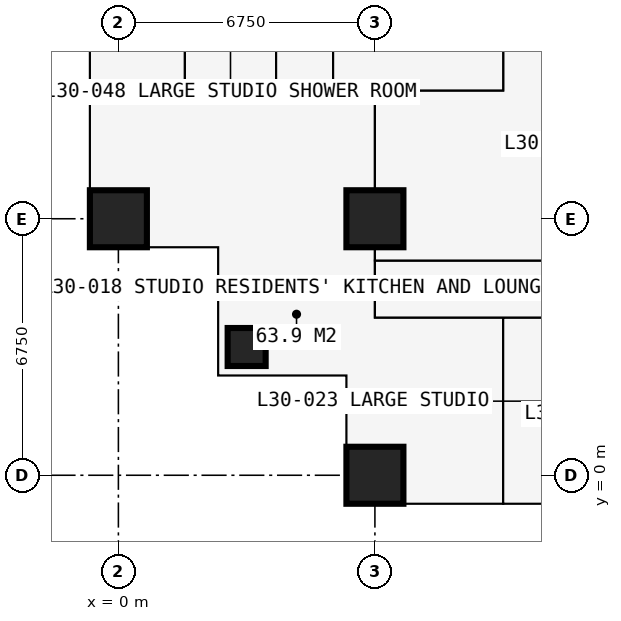
"""IFC4 building model, lengths in metres.
Left out: names, types, materials, properties, quantities, classifications, styles, units other than length and angle.
Written with IfcOpenShell. Run it as: python <this file> out.ifc"""

import sys

from ifc_helpers import new_model, si_unit, direction, frame, frame_2d, origin, origin_2d, place, context, subcontext, project, spatial, rectangle, extrude, element, fill, save


model = new_model("IFC4")
c1 = context("Model", 3, precision=1e-05, world=origin(), true_north=direction((0.0, 1.0)))
c2 = subcontext(c1, "Body", "Model", "MODEL_VIEW")
j1 = project(units=[si_unit("LENGTHUNIT", "METRE"), si_unit("PLANEANGLEUNIT", "RADIAN")], contexts=[c1])
p1 = place(None, origin())
s1 = spatial("IfcSite", under=j1, at=p1, CompositionType="ELEMENT")
p2 = place(p1, origin())
s2 = spatial("IfcBuilding", under=s1, at=p2, CompositionType="ELEMENT")
p3 = place(p2, frame((0.0, 0.0, 112.5)))
s3 = spatial("IfcBuildingStorey", under=s2, at=p3, CompositionType="ELEMENT", Elevation=112.5)
p4 = place(p3, frame((0.0, 6.75, 0.0), z_axis=(0.0, 0.0, 1.0), x_axis=(1.0, 0.0, 0.0)))
e1 = element("IfcColumn", 1, at=p4, inside=s3, PredefinedType="COLUMN", context=c2, shape_type="SweptSolid", body=[
    extrude(rectangle(XDim=1.5, YDim=1.5, at=origin_2d()), origin(), (0.0, 0.0, 1.0), 3.6),
])
p5 = place(p3, frame((3.375, 3.375, 0.0), z_axis=(0.0, 0.0, 1.0), x_axis=(1.0, 0.0, 0.0)))
e2 = element("IfcColumn", 2, at=p5, inside=s3, PredefinedType="COLUMN", context=c2, shape_type="SweptSolid", body=[
    extrude(rectangle(XDim=1.0, YDim=1.0, at=origin_2d()), origin(), (0.0, 0.0, 1.0), 3.6),
])
for number, where, z_axis, x_axis in (
    (3, (6.75, 0.0, 0.0), (0.0, 0.0, 1.0), (1.0, 0.0, 0.0)),
    (4, (6.75, 6.75, 0.0), (0.0, 0.0, 1.0), (1.0, 0.0, 0.0)),
):
    element("IfcColumn", number, at=place(p3, frame(where, z_axis=z_axis, x_axis=x_axis)), inside=s3, PredefinedType="COLUMN", context=c2, shape_type="SweptSolid", body=[
        extrude(rectangle(XDim=1.5, YDim=1.5, at=origin_2d()), origin(), (0.0, 0.0, 1.0), 3.6),
    ])
p6 = place(p3, frame((-0.75, 6.0, 0.0), z_axis=(0.0, 0.0, 1.0), x_axis=(1.0, 0.0, 0.0)))
e5 = element("IfcWall", 5, at=p6, inside=s3, PredefinedType="SOLIDWALL", context=c2, shape_type="SweptSolid", body=[
    extrude(rectangle(XDim=3.375, YDim=0.3, at=frame_2d((1.688, 0.0))), origin(), (0.0, 0.0, 1.0), 3.375),
])
p7 = place(p6, frame((1.607, 0.0, 0.9)))
e6 = element("IfcOpeningElement", 6, at=p7, cuts=e5, PredefinedType="OPENING", context=c2, shape_type="SweptSolid", body=[
    extrude(rectangle(XDim=1.5, YDim=1.8, at=frame_2d((0.75, 0.9))), frame((0.0, 0.16, 0.0), z_axis=(0.0, -1.0, 0.0), x_axis=(1.0, 0.0, 0.0)), (0.0, 0.0, 1.0), 0.32),
])
p8 = place(p3, frame((2.625, 6.0, 0.0), z_axis=(0.0, 0.0, 1.0), x_axis=(0.0, -1.0, 0.0)))
e7 = element("IfcWall", 7, at=p8, inside=s3, PredefinedType="SOLIDWALL", context=c2, shape_type="SweptSolid", body=[
    extrude(rectangle(XDim=3.375, YDim=0.3, at=frame_2d((1.688, 0.0))), origin(), (0.0, 0.0, 1.0), 3.375),
])
p9 = place(p8, frame((0.788, 0.0, 0.6)))
e8 = element("IfcOpeningElement", 8, at=p9, cuts=e7, PredefinedType="OPENING", context=c2, shape_type="SweptSolid", body=[
    extrude(rectangle(XDim=1.8, YDim=2.1, at=frame_2d((0.9, 1.05))), frame((0.0, 0.16, 0.0), z_axis=(0.0, -1.0, 0.0), x_axis=(1.0, 0.0, 0.0)), (0.0, 0.0, 1.0), 0.32),
])
p10 = place(p3, frame((2.625, 2.625, 0.0), z_axis=(0.0, 0.0, 1.0), x_axis=(1.0, 0.0, 0.0)))
e9 = element("IfcWall", 9, at=p10, inside=s3, PredefinedType="SOLIDWALL", context=c2, shape_type="SweptSolid", body=[
    extrude(rectangle(XDim=3.375, YDim=0.3, at=frame_2d((1.688, 0.0))), origin(), (0.0, 0.0, 1.0), 3.375),
])
p11 = place(p10, frame((0.788, 0.0, 0.6)))
e10 = element("IfcOpeningElement", 10, at=p11, cuts=e9, PredefinedType="OPENING", context=c2, shape_type="SweptSolid", body=[
    extrude(rectangle(XDim=1.8, YDim=2.1, at=frame_2d((0.9, 1.05))), frame((0.0, 0.16, 0.0), z_axis=(0.0, -1.0, 0.0), x_axis=(1.0, 0.0, 0.0)), (0.0, 0.0, 1.0), 0.32),
])
p12 = place(p3, frame((6.0, 2.625, 0.0), z_axis=(0.0, 0.0, 1.0), x_axis=(0.0, -1.0, 0.0)))
e11 = element("IfcWall", 11, at=p12, inside=s3, PredefinedType="SOLIDWALL", context=c2, shape_type="SweptSolid", body=[
    extrude(rectangle(XDim=3.375, YDim=0.3, at=frame_2d((1.688, 0.0))), origin(), (0.0, 0.0, 1.0), 3.375),
])
p13 = place(p12, frame((0.268, 0.0, 0.9)))
e12 = element("IfcOpeningElement", 12, at=p13, cuts=e11, PredefinedType="OPENING", context=c2, shape_type="SweptSolid", body=[
    extrude(rectangle(XDim=1.5, YDim=1.8, at=frame_2d((0.75, 0.9))), frame((0.0, 0.16, 0.0), z_axis=(0.0, -1.0, 0.0), x_axis=(1.0, 0.0, 0.0)), (0.0, 0.0, 1.0), 0.32),
])
p14 = place(p3, frame((-0.734, 10.125, 0.0), z_axis=(0.0, 0.0, 1.0), x_axis=(1.0, 0.0, 0.0)))
e13 = element("IfcWall", 13, at=p14, inside=s3, PredefinedType="PARTITIONING", context=c2, shape_type="SweptSolid", body=[
    extrude(rectangle(XDim=10.859, YDim=0.15, at=frame_2d((5.429, 0.0))), origin(), (0.0, 0.0, 1.0), 3.375),
])
p15 = place(p3, frame((1.75, 10.125, 0.0), z_axis=(0.0, 0.0, 1.0), x_axis=(0.0, 1.0, 0.0)))
e14 = element("IfcWall", 14, at=p15, inside=s3, PredefinedType="PARTITIONING", context=c2, shape_type="SweptSolid", body=[
    extrude(rectangle(XDim=2.6, YDim=0.1, at=frame_2d((1.3, 0.0))), origin(), (0.0, 0.0, 1.0), 3.375),
])
p16 = place(p15, frame((0.85, 0.0, 0.0)))
e15 = element("IfcOpeningElement", 15, at=p16, cuts=e14, PredefinedType="OPENING", context=c2, shape_type="SweptSolid", body=[
    extrude(rectangle(XDim=0.9, YDim=2.2, at=frame_2d((0.45, 1.1))), frame((0.0, 0.06, 0.0), z_axis=(0.0, -1.0, 0.0), x_axis=(1.0, 0.0, 0.0)), (0.0, 0.0, 1.0), 0.12),
])
p17 = place(p3, frame((4.15, 10.125, 0.0), z_axis=(0.0, 0.0, 1.0), x_axis=(0.0, 1.0, 0.0)))
e16 = element("IfcWall", 16, at=p17, inside=s3, PredefinedType="PARTITIONING", context=c2, shape_type="SweptSolid", body=[
    extrude(rectangle(XDim=16.875, YDim=0.1, at=frame_2d((8.438, 0.0))), origin(), (0.0, 0.0, 1.0), 3.375),
])
p18 = place(p17, frame((4.2, 0.0, 0.0)))
e17 = element("IfcOpeningElement", 17, at=p18, cuts=e16, PredefinedType="OPENING", context=c2, shape_type="SweptSolid", body=[
    extrude(rectangle(XDim=0.95, YDim=2.2, at=frame_2d((0.475, 1.1))), frame((0.0, 0.06, 0.0), z_axis=(0.0, -1.0, 0.0), x_axis=(1.0, 0.0, 0.0)), (0.0, 0.0, 1.0), 0.12),
])
p19 = place(p17, frame((10.95, 0.0, 0.0)))
e18 = element("IfcOpeningElement", 18, at=p19, cuts=e16, PredefinedType="OPENING", context=c2, shape_type="SweptSolid", body=[
    extrude(rectangle(XDim=0.95, YDim=2.2, at=frame_2d((0.475, 1.1))), frame((0.0, 0.06, 0.0), z_axis=(0.0, -1.0, 0.0), x_axis=(1.0, 0.0, 0.0)), (0.0, 0.0, 1.0), 0.12),
])
p20 = place(p3, frame((5.65, 10.125, 0.0), z_axis=(0.0, 0.0, 1.0), x_axis=(0.0, 1.0, 0.0)))
e19 = element("IfcWall", 19, at=p20, inside=s3, PredefinedType="PARTITIONING", context=c2, shape_type="SweptSolid", body=[
    extrude(rectangle(XDim=10.762, YDim=0.15, at=frame_2d((5.381, 0.0))), origin(), (0.0, 0.0, 1.0), 3.375),
])
p21 = place(p20, frame((4.9, 0.0, 0.0)))
e20 = element("IfcOpeningElement", 20, at=p21, cuts=e19, PredefinedType="OPENING", context=c2, shape_type="SweptSolid", body=[
    extrude(rectangle(XDim=0.95, YDim=2.2, at=frame_2d((0.475, 1.1))), frame((0.0, 0.085, 0.0), z_axis=(0.0, -1.0, 0.0), x_axis=(1.0, 0.0, 0.0)), (0.0, 0.0, 1.0), 0.17),
])
p22 = place(p3, frame((6.75, 4.15, 0.0), z_axis=(0.0, 0.0, 1.0), x_axis=(0.0, 1.0, 0.0)))
e21 = element("IfcWall", 21, at=p22, inside=s3, PredefinedType="PARTITIONING", context=c2, shape_type="SweptSolid", body=[
    extrude(rectangle(XDim=5.975, YDim=0.15, at=frame_2d((2.988, 0.0))), origin(), (0.0, 0.0, 1.0), 2.877),
])
p23 = place(p3, frame((6.75, 4.15, 0.0), z_axis=(0.0, 0.0, 1.0), x_axis=(1.0, 0.0, 0.0)))
e22 = element("IfcWall", 22, at=p23, inside=s3, PredefinedType="PARTITIONING", context=c2, shape_type="SweptSolid", body=[
    extrude(rectangle(XDim=23.625, YDim=0.15, at=frame_2d((11.812, 0.0))), origin(), (0.0, 0.0, 1.0), 3.375),
])
p24 = place(p23, frame((1.2, 0.0, 0.0)))
e23 = element("IfcOpeningElement", 23, at=p24, cuts=e22, PredefinedType="OPENING", context=c2, shape_type="SweptSolid", body=[
    extrude(rectangle(XDim=1.0, YDim=2.2, at=frame_2d((0.5, 1.1))), frame((0.0, 0.085, 0.0), z_axis=(0.0, -1.0, 0.0), x_axis=(1.0, 0.0, 0.0)), (0.0, 0.0, 1.0), 0.17),
])
p25 = place(p23, frame((18.475, 0.0, 0.0)))
e24 = element("IfcOpeningElement", 24, at=p25, cuts=e22, PredefinedType="OPENING", context=c2, shape_type="SweptSolid", body=[
    extrude(rectangle(XDim=0.95, YDim=2.2, at=frame_2d((0.475, 1.1))), frame((0.0, 0.085, 0.0), z_axis=(0.0, -1.0, 0.0), x_axis=(1.0, 0.0, 0.0)), (0.0, 0.0, 1.0), 0.17),
])
p26 = place(p23, frame((11.725, 0.0, 0.0)))
e25 = element("IfcOpeningElement", 25, at=p26, cuts=e22, PredefinedType="OPENING", context=c2, shape_type="SweptSolid", body=[
    extrude(rectangle(XDim=0.95, YDim=2.2, at=frame_2d((0.475, 1.1))), frame((0.0, 0.085, 0.0), z_axis=(0.0, -1.0, 0.0), x_axis=(1.0, 0.0, 0.0)), (0.0, 0.0, 1.0), 0.17),
])
p27 = place(p23, frame((4.975, 0.0, 0.0)))
e26 = element("IfcOpeningElement", 26, at=p27, cuts=e22, PredefinedType="OPENING", context=c2, shape_type="SweptSolid", body=[
    extrude(rectangle(XDim=0.95, YDim=2.2, at=frame_2d((0.475, 1.1))), frame((0.0, 0.085, 0.0), z_axis=(0.0, -1.0, 0.0), x_axis=(1.0, 0.0, 0.0)), (0.0, 0.0, 1.0), 0.17),
])
p28 = place(p3, frame((6.75, 5.65, 0.0), z_axis=(0.0, 0.0, 1.0), x_axis=(1.0, 0.0, 0.0)))
e27 = element("IfcWall", 27, at=p28, inside=s3, PredefinedType="PARTITIONING", context=c2, shape_type="SweptSolid", body=[
    extrude(rectangle(XDim=14.137, YDim=0.15, at=frame_2d((7.069, 0.0))), origin(), (0.0, 0.0, 1.0), 3.375),
])
p29 = place(p28, frame((7.55, 0.0, 0.0)))
e28 = element("IfcOpeningElement", 28, at=p29, cuts=e27, PredefinedType="OPENING", context=c2, shape_type="SweptSolid", body=[
    extrude(rectangle(XDim=0.95, YDim=2.2, at=frame_2d((0.475, 1.1))), frame((0.0, 0.085, 0.0), z_axis=(0.0, -1.0, 0.0), x_axis=(1.0, 0.0, 0.0)), (0.0, 0.0, 1.0), 0.17),
])
p30 = place(p3, frame((10.125, -0.734, 0.0), z_axis=(0.0, 0.0, 1.0), x_axis=(0.0, 1.0, 0.0)))
e29 = element("IfcWall", 29, at=p30, inside=s3, PredefinedType="PARTITIONING", context=c2, shape_type="SweptSolid", body=[
    extrude(rectangle(XDim=4.884, YDim=0.15, at=frame_2d((2.442, 0.0))), origin(), (0.0, 0.0, 1.0), 3.375),
])
p31 = place(p3, frame((10.125, 10.125, 0.0), z_axis=(0.0, 0.0, 1.0), x_axis=(0.0, 1.0, 0.0)))
e30 = element("IfcWall", 30, at=p31, inside=s3, PredefinedType="PARTITIONING", context=c2, shape_type="SweptSolid", body=[
    extrude(rectangle(XDim=1.175, YDim=0.15, at=frame_2d((0.587, 0.0))), origin(), (0.0, 0.0, 1.0), 3.375),
])
p32 = place(p7, origin())
e31 = element("IfcWindow", 31, at=p32, inside=s3, PartitioningType="SINGLE_PANEL", PredefinedType="WINDOW", context=c2, shape_type="SweptSolid", body=[
    extrude(rectangle(XDim=1.5, YDim=1.8, at=frame_2d((0.75, 0.9))), frame((0.0, 0.03, 0.0), z_axis=(0.0, -1.0, 0.0), x_axis=(1.0, 0.0, 0.0)), (0.0, 0.0, 1.0), 0.06),
])
fill(e6, e31)
p33 = place(p9, origin())
e32 = element("IfcWindow", 32, at=p33, inside=s3, PartitioningType="SINGLE_PANEL", PredefinedType="WINDOW", context=c2, shape_type="SweptSolid", body=[
    extrude(rectangle(XDim=1.8, YDim=2.1, at=frame_2d((0.9, 1.05))), frame((0.0, 0.03, 0.0), z_axis=(0.0, -1.0, 0.0), x_axis=(1.0, 0.0, 0.0)), (0.0, 0.0, 1.0), 0.06),
])
fill(e8, e32)
p34 = place(p11, origin())
e33 = element("IfcWindow", 33, at=p34, inside=s3, PartitioningType="SINGLE_PANEL", PredefinedType="WINDOW", context=c2, shape_type="SweptSolid", body=[
    extrude(rectangle(XDim=1.8, YDim=2.1, at=frame_2d((0.9, 1.05))), frame((0.0, 0.03, 0.0), z_axis=(0.0, -1.0, 0.0), x_axis=(1.0, 0.0, 0.0)), (0.0, 0.0, 1.0), 0.06),
])
fill(e10, e33)
p35 = place(p13, origin())
e34 = element("IfcWindow", 34, at=p35, inside=s3, PartitioningType="SINGLE_PANEL", PredefinedType="WINDOW", context=c2, shape_type="SweptSolid", body=[
    extrude(rectangle(XDim=1.5, YDim=1.8, at=frame_2d((0.75, 0.9))), frame((0.0, 0.03, 0.0), z_axis=(0.0, -1.0, 0.0), x_axis=(1.0, 0.0, 0.0)), (0.0, 0.0, 1.0), 0.06),
])
fill(e12, e34)
p36 = place(p24, origin())
e35 = element("IfcDoor", 35, at=p36, inside=s3, OperationType="SINGLE_SWING_LEFT", PredefinedType="DOOR", context=c2, shape_type="SweptSolid", body=[
    extrude(rectangle(XDim=1.0, YDim=2.2, at=frame_2d((0.5, 1.1))), frame((0.0, 0.025, 0.0), z_axis=(0.0, -1.0, 0.0), x_axis=(1.0, 0.0, 0.0)), (0.0, 0.0, 1.0), 0.05),
])
fill(e23, e35)
p37 = place(p16, origin())
e36 = element("IfcDoor", 36, at=p37, inside=s3, OperationType="SINGLE_SWING_RIGHT", PredefinedType="DOOR", context=c2, shape_type="SweptSolid", body=[
    extrude(rectangle(XDim=0.9, YDim=2.2, at=frame_2d((0.45, 1.1))), frame((0.0, 0.025, 0.0), z_axis=(0.0, -1.0, 0.0), x_axis=(1.0, 0.0, 0.0)), (0.0, 0.0, 1.0), 0.05),
])
fill(e15, e36)
save(model, sys.argv[1])
